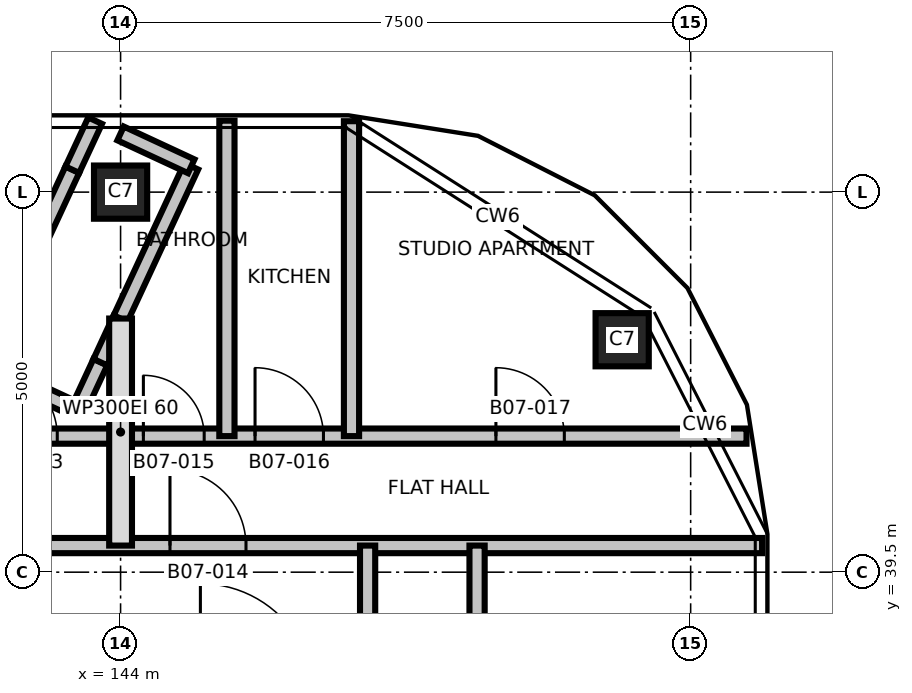
"""IFC4 building model, lengths in metres.
Left out: names, types, materials, properties, quantities, classifications, styles, units other than length and angle.
Written with IfcOpenShell. Run it as: python <this file> out.ifc"""

import sys

from ifc_helpers import new_model, si_unit, direction, frame, frame_2d, origin, origin_2d, place, context, subcontext, project, spatial, rectangle, extrude, element, fill, save


model = new_model("IFC4")
c1 = context("Model", 3, precision=1e-05, world=origin(), true_north=direction((0.0, 1.0)))
c2 = subcontext(c1, "Body", "Model", "MODEL_VIEW")
j1 = project(units=[si_unit("LENGTHUNIT", "METRE"), si_unit("PLANEANGLEUNIT", "RADIAN")], contexts=[c1])
p1 = place(None, origin())
s1 = spatial("IfcSite", under=j1, at=p1, CompositionType="ELEMENT")
p2 = place(p1, origin())
s2 = spatial("IfcBuilding", under=s1, at=p2, CompositionType="ELEMENT")
p3 = place(p2, frame((0.0, 0.0, 87.1)))
s3 = spatial("IfcBuildingStorey", under=s2, at=p3, CompositionType="ELEMENT", Elevation=87.1)
for number, where, z_axis, x_axis in (
    (1, (150.599, 42.558, 0.0), (0.0, 0.0, 1.0), (1.0, 0.0, 0.0)),
    (2, (144.0, 44.5, 0.0), (0.0, 0.0, 1.0), (1.0, 0.0, 0.0)),
):
    element("IfcColumn", number, at=place(p3, frame(where, z_axis=z_axis, x_axis=x_axis)), inside=s3, PredefinedType="COLUMN", context=c2, shape_type="SweptSolid", body=[
        extrude(rectangle(XDim=0.7, YDim=0.7, at=origin_2d()), origin(), (0.0, 0.0, 1.0), 3.7),
    ])
p4 = place(p3, frame((142.169, 42.218, 0.0), z_axis=(0.0, 0.0, 1.0), x_axis=(0.906890025327, -0.421367395466, 0.0)))
e3 = element("IfcWall", 3, at=p4, inside=s3, PredefinedType="PARTITIONING", context=c2, shape_type="SweptSolid", body=[
    extrude(rectangle(XDim=1.4, YDim=0.2, at=frame_2d((0.7, 0.0))), origin(), (0.0, 0.0, 1.0), 3.4),
])
p5 = place(p3, frame((142.169, 42.218, 0.0), z_axis=(0.0, 0.0, 1.0), x_axis=(0.421002733132, 0.907059368893, 0.0)))
e4 = element("IfcWall", 4, at=p5, inside=s3, PredefinedType="PARTITIONING", context=c2, shape_type="SweptSolid", body=[
    extrude(rectangle(XDim=2.841, YDim=0.2, at=frame_2d((1.42, 0.0))), origin(), (0.0, 0.0, 1.0), 3.4),
])
p6 = place(p3, frame((143.439, 41.628, 0.0), z_axis=(0.0, 0.0, 1.0), x_axis=(0.421223998033, 0.906956638148, 0.0)))
e5 = element("IfcWall", 5, at=p6, inside=s3, PredefinedType="PARTITIONING", context=c2, shape_type="SweptSolid", body=[
    extrude(rectangle(XDim=0.7, YDim=0.2, at=frame_2d((0.35, 0.0))), origin(), (0.0, 0.0, 1.0), 3.4),
])
p7 = place(p3, frame((143.365, 44.795, 0.0), z_axis=(0.0, 0.0, 1.0), x_axis=(0.421776680367, 0.90669974738, 0.0)))
e6 = element("IfcWall", 6, at=p7, inside=s3, PredefinedType="PARTITIONING", context=c2, shape_type="SweptSolid", body=[
    extrude(rectangle(XDim=0.711, YDim=0.2, at=frame_2d((0.356, 0.0))), origin(), (0.0, 0.0, 1.0), 3.4),
])
p8 = place(p3, frame((143.734, 42.263, 0.0), z_axis=(0.0, 0.0, 1.0), x_axis=(0.420623716183, 0.907235189675, 0.0)))
e7 = element("IfcWall", 7, at=p8, inside=s3, PredefinedType="PARTITIONING", context=c2, shape_type="SweptSolid", body=[
    extrude(rectangle(XDim=0.633, YDim=0.2, at=frame_2d((0.316, 0.0))), origin(), (0.0, 0.0, 1.0), 3.4),
])
p9 = place(p3, frame((144.0, 42.837, 0.0), z_axis=(0.0, 0.0, 1.0), x_axis=(0.421069082826, 0.907028570382, 0.0)))
e8 = element("IfcWall", 8, at=p9, inside=s3, PredefinedType="PARTITIONING", context=c2, shape_type="SweptSolid", body=[
    extrude(rectangle(XDim=2.208, YDim=0.2, at=frame_2d((1.104, 0.0))), origin(), (0.0, 0.0, 1.0), 3.4),
])
p10 = place(p3, frame((144.0, 45.272, 0.0), z_axis=(0.0, 0.0, 1.0), x_axis=(0.906960240365, -0.42121624185, 0.0)))
e9 = element("IfcWall", 9, at=p10, inside=s3, PredefinedType="PARTITIONING", context=c2, shape_type="SweptSolid", body=[
    extrude(rectangle(XDim=1.025, YDim=0.2, at=frame_2d((0.513, 0.0))), origin(), (0.0, 0.0, 1.0), 3.4),
])
p11 = place(p3, frame((120.56, 39.85, 0.0), z_axis=(0.0, 0.0, 1.0), x_axis=(1.0, 0.0, 0.0)))
e10 = element("IfcWall", 10, at=p11, inside=s3, PredefinedType="PARTITIONING", context=c2, shape_type="SweptSolid", body=[
    extrude(rectangle(XDim=31.88, YDim=0.2, at=frame_2d((15.94, 0.0))), origin(), (0.0, 0.0, 1.0), 3.4),
])
p12 = place(p11, frame((6.79, 0.0, 0.0)))
e11 = element("IfcOpeningElement", 11, at=p12, cuts=e10, PredefinedType="OPENING", context=c2, shape_type="SweptSolid", body=[
    extrude(rectangle(XDim=1.0, YDim=2.1, at=frame_2d((0.5, 1.05))), frame((0.0, 0.11, 0.0), z_axis=(0.0, -1.0, 0.0), x_axis=(1.0, 0.0, 0.0)), (0.0, 0.0, 1.0), 0.22),
])
p13 = place(p11, frame((15.44, 0.0, 0.0)))
e12 = element("IfcOpeningElement", 12, at=p13, cuts=e10, PredefinedType="OPENING", context=c2, shape_type="SweptSolid", body=[
    extrude(rectangle(XDim=1.0, YDim=2.1, at=frame_2d((0.5, 1.05))), frame((0.0, 0.11, 0.0), z_axis=(0.0, -1.0, 0.0), x_axis=(1.0, 0.0, 0.0)), (0.0, 0.0, 1.0), 0.22),
])
p14 = place(p11, frame((24.09, 0.0, 0.0)))
e13 = element("IfcOpeningElement", 13, at=p14, cuts=e10, PredefinedType="OPENING", context=c2, shape_type="SweptSolid", body=[
    extrude(rectangle(XDim=1.0, YDim=2.1, at=frame_2d((0.5, 1.05))), frame((0.0, 0.11, 0.0), z_axis=(0.0, -1.0, 0.0), x_axis=(1.0, 0.0, 0.0)), (0.0, 0.0, 1.0), 0.22),
])
p15 = place(p3, frame((120.765, 41.29, 0.0), z_axis=(0.0, 0.0, 1.0), x_axis=(1.0, 0.0, 0.0)))
e14 = element("IfcWall", 14, at=p15, inside=s3, PredefinedType="PARTITIONING", context=c2, shape_type="SweptSolid", body=[
    extrude(rectangle(XDim=31.47, YDim=0.2, at=frame_2d((15.735, 0.0))), origin(), (0.0, 0.0, 1.0), 3.4),
])
p16 = place(p15, frame((2.397, 0.0, 0.0)))
e15 = element("IfcOpeningElement", 15, at=p16, cuts=e14, PredefinedType="OPENING", context=c2, shape_type="SweptSolid", body=[
    extrude(rectangle(XDim=0.9, YDim=2.1, at=frame_2d((0.45, 1.05))), frame((0.0, 0.11, 0.0), z_axis=(0.0, -1.0, 0.0), x_axis=(1.0, 0.0, 0.0)), (0.0, 0.0, 1.0), 0.22),
])
p17 = place(p15, frame((5.566, 0.0, 0.0)))
e16 = element("IfcOpeningElement", 16, at=p17, cuts=e14, PredefinedType="OPENING", context=c2, shape_type="SweptSolid", body=[
    extrude(rectangle(XDim=0.9, YDim=2.1, at=frame_2d((0.45, 1.05))), frame((0.0, 0.11, 0.0), z_axis=(0.0, -1.0, 0.0), x_axis=(1.0, 0.0, 0.0)), (0.0, 0.0, 1.0), 0.22),
])
p18 = place(p15, frame((7.135, 0.0, 0.0)))
e17 = element("IfcOpeningElement", 17, at=p18, cuts=e14, PredefinedType="OPENING", context=c2, shape_type="SweptSolid", body=[
    extrude(rectangle(XDim=0.8, YDim=2.1, at=frame_2d((0.4, 1.05))), frame((0.0, 0.11, 0.0), z_axis=(0.0, -1.0, 0.0), x_axis=(1.0, 0.0, 0.0)), (0.0, 0.0, 1.0), 0.22),
])
p19 = place(p15, frame((10.319, 0.0, 0.0)))
e18 = element("IfcOpeningElement", 18, at=p19, cuts=e14, PredefinedType="OPENING", context=c2, shape_type="SweptSolid", body=[
    extrude(rectangle(XDim=0.9, YDim=2.1, at=frame_2d((0.45, 1.05))), frame((0.0, 0.11, 0.0), z_axis=(0.0, -1.0, 0.0), x_axis=(1.0, 0.0, 0.0)), (0.0, 0.0, 1.0), 0.22),
])
p20 = place(p15, frame((14.119, 0.0, 0.0)))
e19 = element("IfcOpeningElement", 19, at=p20, cuts=e14, PredefinedType="OPENING", context=c2, shape_type="SweptSolid", body=[
    extrude(rectangle(XDim=0.8, YDim=2.1, at=frame_2d((0.4, 1.05))), frame((0.0, 0.11, 0.0), z_axis=(0.0, -1.0, 0.0), x_axis=(1.0, 0.0, 0.0)), (0.0, 0.0, 1.0), 0.22),
])
p21 = place(p15, frame((17.752, 0.0, 0.0)))
e20 = element("IfcOpeningElement", 20, at=p21, cuts=e14, PredefinedType="OPENING", context=c2, shape_type="SweptSolid", body=[
    extrude(rectangle(XDim=0.9, YDim=2.1, at=frame_2d((0.45, 1.05))), frame((0.0, 0.11, 0.0), z_axis=(0.0, -1.0, 0.0), x_axis=(1.0, 0.0, 0.0)), (0.0, 0.0, 1.0), 0.22),
])
p22 = place(p15, frame((21.502, 0.0, 0.0)))
e21 = element("IfcOpeningElement", 21, at=p22, cuts=e14, PredefinedType="OPENING", context=c2, shape_type="SweptSolid", body=[
    extrude(rectangle(XDim=0.9, YDim=2.1, at=frame_2d((0.45, 1.05))), frame((0.0, 0.11, 0.0), z_axis=(0.0, -1.0, 0.0), x_axis=(1.0, 0.0, 0.0)), (0.0, 0.0, 1.0), 0.22),
])
p23 = place(p15, frame((23.535, 0.0, 0.0)))
e22 = element("IfcOpeningElement", 22, at=p23, cuts=e14, PredefinedType="OPENING", context=c2, shape_type="SweptSolid", body=[
    extrude(rectangle(XDim=0.8, YDim=2.1, at=frame_2d((0.4, 1.05))), frame((0.0, 0.11, 0.0), z_axis=(0.0, -1.0, 0.0), x_axis=(1.0, 0.0, 0.0)), (0.0, 0.0, 1.0), 0.22),
])
p24 = place(p15, frame((25.004, 0.0, 0.0)))
e23 = element("IfcOpeningElement", 23, at=p24, cuts=e14, PredefinedType="OPENING", context=c2, shape_type="SweptSolid", body=[
    extrude(rectangle(XDim=0.9, YDim=2.1, at=frame_2d((0.45, 1.05))), frame((0.0, 0.11, 0.0), z_axis=(0.0, -1.0, 0.0), x_axis=(1.0, 0.0, 0.0)), (0.0, 0.0, 1.0), 0.22),
])
p25 = place(p15, frame((28.173, 0.0, 0.0)))
e24 = element("IfcOpeningElement", 24, at=p25, cuts=e14, PredefinedType="OPENING", context=c2, shape_type="SweptSolid", body=[
    extrude(rectangle(XDim=0.9, YDim=2.1, at=frame_2d((0.45, 1.05))), frame((0.0, 0.11, 0.0), z_axis=(0.0, -1.0, 0.0), x_axis=(1.0, 0.0, 0.0)), (0.0, 0.0, 1.0), 0.22),
])
p26 = place(p3, frame((144.0, 39.85, 0.0), z_axis=(0.0, 0.0, 1.0), x_axis=(0.0, 1.0, 0.0)))
e25 = element("IfcWall", 25, at=p26, inside=s3, PredefinedType="PARTITIONING", context=c2, shape_type="SweptSolid", body=[
    extrude(rectangle(XDim=2.987, YDim=0.3, at=frame_2d((1.493, 0.0))), origin(), (0.0, 0.0, 1.0), 3.4),
])
p27 = place(p3, frame((145.399, 41.29, 0.0), z_axis=(0.0, 0.0, 1.0), x_axis=(0.0, 1.0, 0.0)))
e26 = element("IfcWall", 26, at=p27, inside=s3, PredefinedType="PARTITIONING", context=c2, shape_type="SweptSolid", body=[
    extrude(rectangle(XDim=4.15, YDim=0.2, at=frame_2d((2.075, 0.0))), origin(), (0.0, 0.0, 1.0), 3.4),
])
p28 = place(p3, frame((147.038, 41.29, 0.0), z_axis=(0.0, 0.0, 1.0), x_axis=(0.0, 1.0, 0.0)))
e27 = element("IfcWall", 27, at=p28, inside=s3, PredefinedType="PARTITIONING", context=c2, shape_type="SweptSolid", body=[
    extrude(rectangle(XDim=4.143, YDim=0.2, at=frame_2d((2.072, 0.0))), origin(), (0.0, 0.0, 1.0), 3.4),
])
p29 = place(p3, frame((147.25, 22.15, 0.0), z_axis=(0.0, 0.0, 1.0), x_axis=(0.0, 1.0, 0.0)))
e28 = element("IfcWall", 28, at=p29, inside=s3, PredefinedType="PARTITIONING", context=c2, shape_type="SweptSolid", body=[
    extrude(rectangle(XDim=17.7, YDim=0.2, at=frame_2d((8.85, 0.0))), origin(), (0.0, 0.0, 1.0), 3.4),
])
p30 = place(p29, frame((2.65, 0.0, 0.0)))
e29 = element("IfcOpeningElement", 29, at=p30, cuts=e28, PredefinedType="OPENING", context=c2, shape_type="SweptSolid", body=[
    extrude(rectangle(XDim=1.0, YDim=2.1, at=frame_2d((0.5, 1.05))), frame((0.0, 0.11, 0.0), z_axis=(0.0, -1.0, 0.0), x_axis=(1.0, 0.0, 0.0)), (0.0, 0.0, 1.0), 0.22),
])
p31 = place(p3, frame((148.69, 22.15, 0.0), z_axis=(0.0, 0.0, 1.0), x_axis=(0.0, 1.0, 0.0)))
e30 = element("IfcWall", 30, at=p31, inside=s3, PredefinedType="PARTITIONING", context=c2, shape_type="SweptSolid", body=[
    extrude(rectangle(XDim=17.7, YDim=0.2, at=frame_2d((8.85, 0.0))), origin(), (0.0, 0.0, 1.0), 3.4),
])
p32 = place(p31, frame((1.028, 0.0, 0.0)))
e31 = element("IfcOpeningElement", 31, at=p32, cuts=e30, PredefinedType="OPENING", context=c2, shape_type="SweptSolid", body=[
    extrude(rectangle(XDim=0.9, YDim=2.1, at=frame_2d((0.45, 1.05))), frame((0.0, 0.11, 0.0), z_axis=(0.0, -1.0, 0.0), x_axis=(1.0, 0.0, 0.0)), (0.0, 0.0, 1.0), 0.22),
])
p33 = place(p31, frame((3.253, 0.0, 0.0)))
e32 = element("IfcOpeningElement", 32, at=p33, cuts=e30, PredefinedType="OPENING", context=c2, shape_type="SweptSolid", body=[
    extrude(rectangle(XDim=0.8, YDim=2.1, at=frame_2d((0.4, 1.05))), frame((0.0, 0.11, 0.0), z_axis=(0.0, -1.0, 0.0), x_axis=(1.0, 0.0, 0.0)), (0.0, 0.0, 1.0), 0.22),
])
p34 = place(p31, frame((6.867, 0.0, 0.0)))
e33 = element("IfcOpeningElement", 33, at=p34, cuts=e30, PredefinedType="OPENING", context=c2, shape_type="SweptSolid", body=[
    extrude(rectangle(XDim=0.9, YDim=2.1, at=frame_2d((0.45, 1.05))), frame((0.0, 0.11, 0.0), z_axis=(0.0, -1.0, 0.0), x_axis=(1.0, 0.0, 0.0)), (0.0, 0.0, 1.0), 0.22),
])
p35 = place(p31, frame((11.367, 0.0, 0.0)))
e34 = element("IfcOpeningElement", 34, at=p35, cuts=e30, PredefinedType="OPENING", context=c2, shape_type="SweptSolid", body=[
    extrude(rectangle(XDim=0.9, YDim=2.1, at=frame_2d((0.45, 1.05))), frame((0.0, 0.11, 0.0), z_axis=(0.0, -1.0, 0.0), x_axis=(1.0, 0.0, 0.0)), (0.0, 0.0, 1.0), 0.22),
])
p36 = place(p31, frame((15.075, 0.0, 0.0)))
e35 = element("IfcOpeningElement", 35, at=p36, cuts=e30, PredefinedType="OPENING", context=c2, shape_type="SweptSolid", body=[
    extrude(rectangle(XDim=0.9, YDim=2.1, at=frame_2d((0.45, 1.05))), frame((0.0, 0.11, 0.0), z_axis=(0.0, -1.0, 0.0), x_axis=(1.0, 0.0, 0.0)), (0.0, 0.0, 1.0), 0.22),
])
p37 = place(p22, origin())
e36 = element("IfcDoor", 36, at=p37, inside=s3, OperationType="SINGLE_SWING_LEFT", PredefinedType="DOOR", context=c2, shape_type="SweptSolid", body=[
    extrude(rectangle(XDim=0.9, YDim=2.1, at=frame_2d((0.45, 1.05))), frame((0.0, 0.025, 0.0), z_axis=(0.0, -1.0, 0.0), x_axis=(1.0, 0.0, 0.0)), (0.0, 0.0, 1.0), 0.05),
])
fill(e21, e36)
p38 = place(p14, origin())
e37 = element("IfcDoor", 37, at=p38, inside=s3, OperationType="SINGLE_SWING_RIGHT", PredefinedType="DOOR", context=c2, shape_type="SweptSolid", body=[
    extrude(rectangle(XDim=1.0, YDim=2.1, at=frame_2d((0.5, 1.05))), frame((0.0, 0.025, 0.0), z_axis=(0.0, -1.0, 0.0), x_axis=(1.0, 0.0, 0.0)), (0.0, 0.0, 1.0), 0.05),
])
fill(e13, e37)
p39 = place(p23, origin())
e38 = element("IfcDoor", 38, at=p39, inside=s3, OperationType="SINGLE_SWING_LEFT", PredefinedType="DOOR", context=c2, shape_type="SweptSolid", body=[
    extrude(rectangle(XDim=0.8, YDim=2.1, at=frame_2d((0.4, 1.05))), frame((0.0, 0.025, 0.0), z_axis=(0.0, -1.0, 0.0), x_axis=(1.0, 0.0, 0.0)), (0.0, 0.0, 1.0), 0.05),
])
fill(e22, e38)
p40 = place(p24, origin())
e39 = element("IfcDoor", 39, at=p40, inside=s3, OperationType="SINGLE_SWING_RIGHT", PredefinedType="DOOR", context=c2, shape_type="SweptSolid", body=[
    extrude(rectangle(XDim=0.9, YDim=2.1, at=frame_2d((0.45, 1.05))), frame((0.0, 0.025, 0.0), z_axis=(0.0, -1.0, 0.0), x_axis=(1.0, 0.0, 0.0)), (0.0, 0.0, 1.0), 0.05),
])
fill(e23, e39)
p41 = place(p25, origin())
e40 = element("IfcDoor", 40, at=p41, inside=s3, OperationType="SINGLE_SWING_LEFT", PredefinedType="DOOR", context=c2, shape_type="SweptSolid", body=[
    extrude(rectangle(XDim=0.9, YDim=2.1, at=frame_2d((0.45, 1.05))), frame((0.0, 0.025, 0.0), z_axis=(0.0, -1.0, 0.0), x_axis=(1.0, 0.0, 0.0)), (0.0, 0.0, 1.0), 0.05),
])
fill(e24, e40)
save(model, sys.argv[1])
